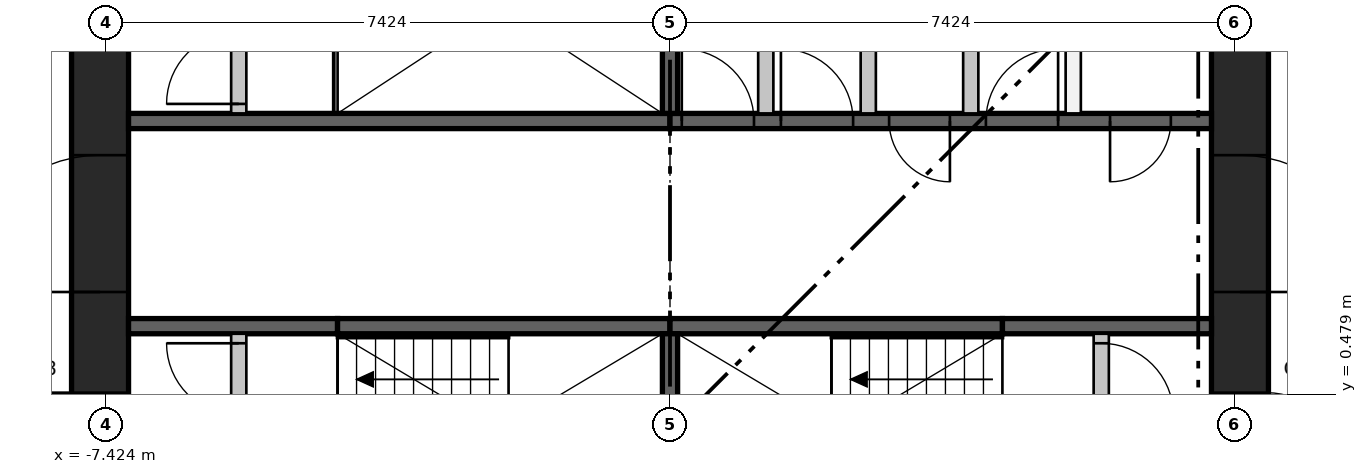
"""IFC4 building model, lengths in metres.
Left out: names, types, materials, properties, quantities, classifications, styles, units other than length and angle.
Written with IfcOpenShell. Run it as: python <this file> out.ifc"""

import sys

from ifc_helpers import new_model, si_unit, direction, frame, frame_2d, origin, place, context, subcontext, project, spatial, rectangle, extrude, element, fill, save


model = new_model("IFC4")
c1 = context("Model", 3, precision=1e-05, world=origin(), true_north=direction((0.0, 1.0)))
c2 = subcontext(c1, "Body", "Model", "MODEL_VIEW")
j1 = project(units=[si_unit("LENGTHUNIT", "METRE"), si_unit("PLANEANGLEUNIT", "RADIAN")], contexts=[c1])
p1 = place(None, origin())
s1 = spatial("IfcSite", under=j1, at=p1, CompositionType="ELEMENT")
p2 = place(p1, origin())
s2 = spatial("IfcBuilding", under=s1, at=p2, CompositionType="ELEMENT")
p3 = place(p2, frame((0.0, 0.0, 112.9)))
s3 = spatial("IfcBuildingStorey", under=s2, at=p3, CompositionType="ELEMENT", Elevation=112.9)
p4 = place(p3, frame((-7.499, -7.124, 0.0), z_axis=(0.0, 0.0, 1.0), x_axis=(0.0, 1.0, 0.0)))
e1 = element("IfcWall", 1, at=p4, inside=s3, PredefinedType="SHEAR", context=c2, shape_type="SweptSolid", body=[
    extrude(rectangle(XDim=14.248, YDim=0.75, at=frame_2d((7.124, 0.0))), origin(), (0.0, 0.0, 1.0), 3.65),
])
p5 = place(p4, frame((6.624, 0.0, 0.0)))
e2 = element("IfcOpeningElement", 2, at=p5, cuts=e1, PredefinedType="OPENING", context=c2, shape_type="SweptSolid", body=[
    extrude(rectangle(XDim=1.0, YDim=2.1, at=frame_2d((0.5, 1.05))), frame((0.0, 0.385, 0.0), z_axis=(0.0, -1.0, 0.0), x_axis=(1.0, 0.0, 0.0)), (0.0, 0.0, 1.0), 0.77),
])
p6 = place(p4, frame((3.5, 0.0, 0.0)))
e3 = element("IfcOpeningElement", 3, at=p6, cuts=e1, PredefinedType="OPENING", context=c2, shape_type="SweptSolid", body=[
    extrude(rectangle(XDim=1.8, YDim=2.1, at=frame_2d((0.9, 1.05))), frame((0.0, 0.385, 0.0), z_axis=(0.0, -1.0, 0.0), x_axis=(1.0, 0.0, 0.0)), (0.0, 0.0, 1.0), 0.77),
])
p7 = place(p4, frame((8.948, 0.0, 0.0)))
e4 = element("IfcOpeningElement", 4, at=p7, cuts=e1, PredefinedType="OPENING", context=c2, shape_type="SweptSolid", body=[
    extrude(rectangle(XDim=1.8, YDim=2.1, at=frame_2d((0.9, 1.05))), frame((0.0, 0.385, 0.0), z_axis=(0.0, -1.0, 0.0), x_axis=(1.0, 0.0, 0.0)), (0.0, 0.0, 1.0), 0.77),
])
p8 = place(p4, frame((12.124, 0.0, 0.0)))
e5 = element("IfcOpeningElement", 5, at=p8, cuts=e1, PredefinedType="OPENING", context=c2, shape_type="SweptSolid", body=[
    extrude(rectangle(XDim=1.0, YDim=2.1, at=frame_2d((0.5, 1.05))), frame((0.0, 0.385, 0.0), z_axis=(0.0, -1.0, 0.0), x_axis=(1.0, 0.0, 0.0)), (0.0, 0.0, 1.0), 0.77),
])
p9 = place(p3, frame((7.499, -7.124, 0.0), z_axis=(0.0, 0.0, 1.0), x_axis=(0.0, 1.0, 0.0)))
e6 = element("IfcWall", 6, at=p9, inside=s3, PredefinedType="SHEAR", context=c2, shape_type="SweptSolid", body=[
    extrude(rectangle(XDim=14.248, YDim=0.75, at=frame_2d((7.124, 0.0))), origin(), (0.0, 0.0, 1.0), 3.65),
])
p10 = place(p9, frame((6.624, 0.0, 0.0)))
e7 = element("IfcOpeningElement", 7, at=p10, cuts=e6, PredefinedType="OPENING", context=c2, shape_type="SweptSolid", body=[
    extrude(rectangle(XDim=1.0, YDim=2.1, at=frame_2d((0.5, 1.05))), frame((0.0, 0.385, 0.0), z_axis=(0.0, -1.0, 0.0), x_axis=(1.0, 0.0, 0.0)), (0.0, 0.0, 1.0), 0.77),
])
p11 = place(p9, frame((3.5, 0.0, 0.0)))
e8 = element("IfcOpeningElement", 8, at=p11, cuts=e6, PredefinedType="OPENING", context=c2, shape_type="SweptSolid", body=[
    extrude(rectangle(XDim=1.8, YDim=2.1, at=frame_2d((0.9, 1.05))), frame((0.0, 0.385, 0.0), z_axis=(0.0, -1.0, 0.0), x_axis=(1.0, 0.0, 0.0)), (0.0, 0.0, 1.0), 0.77),
])
p12 = place(p9, frame((8.948, 0.0, 0.0)))
e9 = element("IfcOpeningElement", 9, at=p12, cuts=e6, PredefinedType="OPENING", context=c2, shape_type="SweptSolid", body=[
    extrude(rectangle(XDim=1.8, YDim=2.1, at=frame_2d((0.9, 1.05))), frame((0.0, 0.385, 0.0), z_axis=(0.0, -1.0, 0.0), x_axis=(1.0, 0.0, 0.0)), (0.0, 0.0, 1.0), 0.77),
])
p13 = place(p3, frame((-7.124, 4.074, 0.0), z_axis=(0.0, 0.0, 1.0), x_axis=(1.0, 0.0, 0.0)))
e10 = element("IfcWall", 10, at=p13, inside=s3, PredefinedType="SHEAR", context=c2, shape_type="SweptSolid", body=[
    extrude(rectangle(XDim=7.124, YDim=0.2, at=frame_2d((3.562, 0.0))), origin(), (0.0, 0.0, 1.0), 3.3),
])
p14 = place(p3, frame((0.0, 4.074, 0.0), z_axis=(0.0, 0.0, 1.0), x_axis=(1.0, 0.0, 0.0)))
e11 = element("IfcWall", 11, at=p14, inside=s3, PredefinedType="SHEAR", context=c2, shape_type="SweptSolid", body=[
    extrude(rectangle(XDim=7.124, YDim=0.2, at=frame_2d((3.562, 0.0))), origin(), (0.0, 0.0, 1.0), 3.3),
])
p15 = place(p14, frame((0.155, 0.0, 0.0)))
e12 = element("IfcOpeningElement", 12, at=p15, cuts=e11, PredefinedType="OPENING", context=c2, shape_type="SweptSolid", body=[
    extrude(rectangle(XDim=0.95, YDim=2.1, at=frame_2d((0.475, 1.05))), frame((0.0, 0.11, 0.0), z_axis=(0.0, -1.0, 0.0), x_axis=(1.0, 0.0, 0.0)), (0.0, 0.0, 1.0), 0.22),
])
p16 = place(p14, frame((1.459, 0.0, 0.0)))
e13 = element("IfcOpeningElement", 13, at=p16, cuts=e11, PredefinedType="OPENING", context=c2, shape_type="SweptSolid", body=[
    extrude(rectangle(XDim=0.95, YDim=2.1, at=frame_2d((0.475, 1.05))), frame((0.0, 0.11, 0.0), z_axis=(0.0, -1.0, 0.0), x_axis=(1.0, 0.0, 0.0)), (0.0, 0.0, 1.0), 0.22),
])
p17 = place(p14, frame((2.883, 0.0, 0.0)))
e14 = element("IfcOpeningElement", 14, at=p17, cuts=e11, PredefinedType="OPENING", context=c2, shape_type="SweptSolid", body=[
    extrude(rectangle(XDim=0.8, YDim=2.1, at=frame_2d((0.4, 1.05))), frame((0.0, 0.11, 0.0), z_axis=(0.0, -1.0, 0.0), x_axis=(1.0, 0.0, 0.0)), (0.0, 0.0, 1.0), 0.22),
])
p18 = place(p14, frame((4.156, 0.0, 0.0)))
e15 = element("IfcOpeningElement", 15, at=p18, cuts=e11, PredefinedType="OPENING", context=c2, shape_type="SweptSolid", body=[
    extrude(rectangle(XDim=0.95, YDim=2.1, at=frame_2d((0.475, 1.05))), frame((0.0, 0.11, 0.0), z_axis=(0.0, -1.0, 0.0), x_axis=(1.0, 0.0, 0.0)), (0.0, 0.0, 1.0), 0.22),
])
p19 = place(p14, frame((5.79, 0.0, 0.0)))
e16 = element("IfcOpeningElement", 16, at=p19, cuts=e11, PredefinedType="OPENING", context=c2, shape_type="SweptSolid", body=[
    extrude(rectangle(XDim=0.8, YDim=2.1, at=frame_2d((0.4, 1.05))), frame((0.0, 0.11, 0.0), z_axis=(0.0, -1.0, 0.0), x_axis=(1.0, 0.0, 0.0)), (0.0, 0.0, 1.0), 0.22),
])
p20 = place(p3, frame((-7.124, 1.375, 0.0), z_axis=(0.0, 0.0, 1.0), x_axis=(1.0, 0.0, 0.0)))
e17 = element("IfcWall", 17, at=p20, inside=s3, PredefinedType="SHEAR", context=c2, shape_type="SweptSolid", body=[
    extrude(rectangle(XDim=2.75, YDim=0.2, at=frame_2d((1.375, 0.0))), origin(), (0.0, 0.0, 1.0), 3.3),
])
for number, where, z_axis, x_axis in (
    (18, (-4.374, 1.375, 0.0), (0.0, 0.0, 1.0), (1.0, 0.0, 0.0)),
    (19, (0.0, 1.375, 0.0), (0.0, 0.0, 1.0), (1.0, 0.0, 0.0)),
):
    element("IfcWall", number, at=place(p3, frame(where, z_axis=z_axis, x_axis=x_axis)), inside=s3, PredefinedType="SHEAR", context=c2, shape_type="SweptSolid", body=[
        extrude(rectangle(XDim=4.374, YDim=0.2, at=frame_2d((2.187, 0.0))), origin(), (0.0, 0.0, 1.0), 3.3),
    ])
p21 = place(p3, frame((4.374, 1.375, 0.0), z_axis=(0.0, 0.0, 1.0), x_axis=(1.0, 0.0, 0.0)))
e20 = element("IfcWall", 20, at=p21, inside=s3, PredefinedType="SHEAR", context=c2, shape_type="SweptSolid", body=[
    extrude(rectangle(XDim=2.75, YDim=0.2, at=frame_2d((1.375, 0.0))), origin(), (0.0, 0.0, 1.0), 3.3),
])
p22 = place(p3, frame((0.0, -1.275, 0.0), z_axis=(0.0, 0.0, 1.0), x_axis=(0.0, 1.0, 0.0)))
e21 = element("IfcWall", 21, at=p22, inside=s3, PredefinedType="SHEAR", context=c2, shape_type="SweptSolid", body=[
    extrude(rectangle(XDim=2.55, YDim=0.2, at=frame_2d((1.275, 0.0))), origin(), (0.0, 0.0, 1.0), 3.3),
])
p23 = place(p3, frame((0.0, 4.174, 0.0), z_axis=(0.0, 0.0, 1.0), x_axis=(0.0, 1.0, 0.0)))
e22 = element("IfcWall", 22, at=p23, inside=s3, PredefinedType="SHEAR", context=c2, shape_type="SweptSolid", body=[
    extrude(rectangle(XDim=1.4, YDim=0.2, at=frame_2d((0.7, 0.0))), origin(), (0.0, 0.0, 1.0), 3.3),
])
for number, where, z_axis, x_axis in (
    (23, (1.26, 4.174, 0.0), (0.0, 0.0, 1.0), (0.0, 1.0, 0.0)),
    (24, (2.609, 4.174, 0.0), (0.0, 0.0, 1.0), (0.0, 1.0, 0.0)),
    (25, (3.957, 4.174, 0.0), (0.0, 0.0, 1.0), (0.0, 1.0, 0.0)),
    (26, (5.305, 4.174, 0.0), (0.0, 0.0, 1.0), (0.0, 1.0, 0.0)),
):
    element("IfcWall", number, at=place(p3, frame(where, z_axis=z_axis, x_axis=x_axis)), inside=s3, PredefinedType="PARTITIONING", context=c2, shape_type="SweptSolid", body=[
        extrude(rectangle(XDim=2.95, YDim=0.2, at=frame_2d((1.475, 0.0))), origin(), (0.0, 0.0, 1.0), 3.3),
    ])
p24 = place(p3, frame((-5.674, -1.275, 0.0), z_axis=(0.0, 0.0, 1.0), x_axis=(0.0, 1.0, 0.0)))
e27 = element("IfcWall", 27, at=p24, inside=s3, PredefinedType="PARTITIONING", context=c2, shape_type="SweptSolid", body=[
    extrude(rectangle(XDim=2.55, YDim=0.2, at=frame_2d((1.275, 0.0))), origin(), (0.0, 0.0, 1.0), 3.3),
])
p25 = place(p24, frame((0.125, 0.0, 0.0)))
e28 = element("IfcOpeningElement", 28, at=p25, cuts=e27, PredefinedType="OPENING", context=c2, shape_type="SweptSolid", body=[
    extrude(rectangle(XDim=0.95, YDim=2.1, at=frame_2d((0.475, 1.05))), frame((0.0, 0.11, 0.0), z_axis=(0.0, -1.0, 0.0), x_axis=(1.0, 0.0, 0.0)), (0.0, 0.0, 1.0), 0.22),
])
p26 = place(p24, frame((1.475, 0.0, 0.0)))
e29 = element("IfcOpeningElement", 29, at=p26, cuts=e27, PredefinedType="OPENING", context=c2, shape_type="SweptSolid", body=[
    extrude(rectangle(XDim=0.95, YDim=2.1, at=frame_2d((0.475, 1.05))), frame((0.0, 0.11, 0.0), z_axis=(0.0, -1.0, 0.0), x_axis=(1.0, 0.0, 0.0)), (0.0, 0.0, 1.0), 0.22),
])
p27 = place(p3, frame((5.674, -1.275, 0.0), z_axis=(0.0, 0.0, 1.0), x_axis=(0.0, 1.0, 0.0)))
e30 = element("IfcWall", 30, at=p27, inside=s3, PredefinedType="PARTITIONING", context=c2, shape_type="SweptSolid", body=[
    extrude(rectangle(XDim=2.55, YDim=0.2, at=frame_2d((1.275, 0.0))), origin(), (0.0, 0.0, 1.0), 3.3),
])
p28 = place(p27, frame((0.125, 0.0, 0.0)))
e31 = element("IfcOpeningElement", 31, at=p28, cuts=e30, PredefinedType="OPENING", context=c2, shape_type="SweptSolid", body=[
    extrude(rectangle(XDim=0.95, YDim=2.1, at=frame_2d((0.475, 1.05))), frame((0.0, 0.11, 0.0), z_axis=(0.0, -1.0, 0.0), x_axis=(1.0, 0.0, 0.0)), (0.0, 0.0, 1.0), 0.22),
])
p29 = place(p27, frame((1.475, 0.0, 0.0)))
e32 = element("IfcOpeningElement", 32, at=p29, cuts=e30, PredefinedType="OPENING", context=c2, shape_type="SweptSolid", body=[
    extrude(rectangle(XDim=0.95, YDim=2.1, at=frame_2d((0.475, 1.05))), frame((0.0, 0.11, 0.0), z_axis=(0.0, -1.0, 0.0), x_axis=(1.0, 0.0, 0.0)), (0.0, 0.0, 1.0), 0.22),
])
p30 = place(p3, frame((-5.674, 4.174, 0.0), z_axis=(0.0, 0.0, 1.0), x_axis=(0.0, 1.0, 0.0)))
e33 = element("IfcWall", 33, at=p30, inside=s3, PredefinedType="PARTITIONING", context=c2, shape_type="SweptSolid", body=[
    extrude(rectangle(XDim=2.95, YDim=0.2, at=frame_2d((1.475, 0.0))), origin(), (0.0, 0.0, 1.0), 3.3),
])
p31 = place(p30, frame((0.125, 0.0, 0.0)))
e34 = element("IfcOpeningElement", 34, at=p31, cuts=e33, PredefinedType="OPENING", context=c2, shape_type="SweptSolid", body=[
    extrude(rectangle(XDim=0.95, YDim=2.1, at=frame_2d((0.475, 1.05))), frame((0.0, 0.11, 0.0), z_axis=(0.0, -1.0, 0.0), x_axis=(1.0, 0.0, 0.0)), (0.0, 0.0, 1.0), 0.22),
])
p32 = place(p30, frame((1.725, 0.0, 0.0)))
e35 = element("IfcOpeningElement", 35, at=p32, cuts=e33, PredefinedType="OPENING", context=c2, shape_type="SweptSolid", body=[
    extrude(rectangle(XDim=0.95, YDim=2.1, at=frame_2d((0.475, 1.05))), frame((0.0, 0.11, 0.0), z_axis=(0.0, -1.0, 0.0), x_axis=(1.0, 0.0, 0.0)), (0.0, 0.0, 1.0), 0.22),
])
p33 = place(p26, origin())
e36 = element("IfcDoor", 36, at=p33, inside=s3, OperationType="SINGLE_SWING_RIGHT", PredefinedType="DOOR", context=c2, shape_type="SweptSolid", body=[
    extrude(rectangle(XDim=0.95, YDim=2.1, at=frame_2d((0.475, 1.05))), frame((0.0, 0.025, 0.0), z_axis=(0.0, -1.0, 0.0), x_axis=(1.0, 0.0, 0.0)), (0.0, 0.0, 1.0), 0.05),
])
fill(e29, e36)
p34 = place(p29, frame((0.95, 0.0, 0.0), z_axis=(0.0, 0.0, 1.0), x_axis=(-1.0, 0.0, 0.0)))
e37 = element("IfcDoor", 37, at=p34, inside=s3, OperationType="SINGLE_SWING_LEFT", PredefinedType="DOOR", context=c2, shape_type="SweptSolid", body=[
    extrude(rectangle(XDim=0.95, YDim=2.1, at=frame_2d((0.475, 1.05))), frame((0.0, 0.025, 0.0), z_axis=(0.0, -1.0, 0.0), x_axis=(1.0, 0.0, 0.0)), (0.0, 0.0, 1.0), 0.05),
])
fill(e32, e37)
p35 = place(p31, origin())
e38 = element("IfcDoor", 38, at=p35, inside=s3, OperationType="SINGLE_SWING_LEFT", PredefinedType="DOOR", context=c2, shape_type="SweptSolid", body=[
    extrude(rectangle(XDim=0.95, YDim=2.1, at=frame_2d((0.475, 1.05))), frame((0.0, 0.025, 0.0), z_axis=(0.0, -1.0, 0.0), x_axis=(1.0, 0.0, 0.0)), (0.0, 0.0, 1.0), 0.05),
])
fill(e34, e38)
p36 = place(p15, origin())
e39 = element("IfcDoor", 39, at=p36, inside=s3, OperationType="SINGLE_SWING_LEFT", PredefinedType="DOOR", context=c2, shape_type="SweptSolid", body=[
    extrude(rectangle(XDim=0.95, YDim=2.1, at=frame_2d((0.475, 1.05))), frame((0.0, 0.025, 0.0), z_axis=(0.0, -1.0, 0.0), x_axis=(1.0, 0.0, 0.0)), (0.0, 0.0, 1.0), 0.05),
])
fill(e12, e39)
p37 = place(p16, origin())
e40 = element("IfcDoor", 40, at=p37, inside=s3, OperationType="SINGLE_SWING_LEFT", PredefinedType="DOOR", context=c2, shape_type="SweptSolid", body=[
    extrude(rectangle(XDim=0.95, YDim=2.1, at=frame_2d((0.475, 1.05))), frame((0.0, 0.025, 0.0), z_axis=(0.0, -1.0, 0.0), x_axis=(1.0, 0.0, 0.0)), (0.0, 0.0, 1.0), 0.05),
])
fill(e13, e40)
p38 = place(p17, frame((0.8, 0.0, 0.0), z_axis=(0.0, 0.0, 1.0), x_axis=(-1.0, 0.0, 0.0)))
e41 = element("IfcDoor", 41, at=p38, inside=s3, OperationType="SINGLE_SWING_RIGHT", PredefinedType="DOOR", context=c2, shape_type="SweptSolid", body=[
    extrude(rectangle(XDim=0.8, YDim=2.1, at=frame_2d((0.4, 1.05))), frame((0.0, 0.025, 0.0), z_axis=(0.0, -1.0, 0.0), x_axis=(1.0, 0.0, 0.0)), (0.0, 0.0, 1.0), 0.05),
])
fill(e14, e41)
p39 = place(p18, origin())
e42 = element("IfcDoor", 42, at=p39, inside=s3, OperationType="SINGLE_SWING_RIGHT", PredefinedType="DOOR", context=c2, shape_type="SweptSolid", body=[
    extrude(rectangle(XDim=0.95, YDim=2.1, at=frame_2d((0.475, 1.05))), frame((0.0, 0.025, 0.0), z_axis=(0.0, -1.0, 0.0), x_axis=(1.0, 0.0, 0.0)), (0.0, 0.0, 1.0), 0.05),
])
fill(e15, e42)
p40 = place(p19, frame((0.8, 0.0, 0.0), z_axis=(0.0, 0.0, 1.0), x_axis=(-1.0, 0.0, 0.0)))
e43 = element("IfcDoor", 43, at=p40, inside=s3, OperationType="SINGLE_SWING_LEFT", PredefinedType="DOOR", context=c2, shape_type="SweptSolid", body=[
    extrude(rectangle(XDim=0.8, YDim=2.1, at=frame_2d((0.4, 1.05))), frame((0.0, 0.025, 0.0), z_axis=(0.0, -1.0, 0.0), x_axis=(1.0, 0.0, 0.0)), (0.0, 0.0, 1.0), 0.05),
])
fill(e16, e43)
p41 = place(p5, origin())
e44 = element("IfcDoor", 44, at=p41, inside=s3, OperationType="SINGLE_SWING_RIGHT", PredefinedType="DOOR", context=c2, shape_type="SweptSolid", body=[
    extrude(rectangle(XDim=1.0, YDim=2.1, at=frame_2d((0.5, 1.05))), frame((0.0, 0.375, 0.0), z_axis=(0.0, -1.0, 0.0), x_axis=(1.0, 0.0, 0.0)), (0.0, 0.0, 1.0), 0.05),
])
fill(e2, e44)
p42 = place(p7, origin())
e45 = element("IfcDoor", 45, at=p42, inside=s3, OperationType="DOUBLE_DOOR_SINGLE_SWING", PredefinedType="DOOR", context=c2, shape_type="SweptSolid", body=[
    extrude(rectangle(XDim=1.8, YDim=2.1, at=frame_2d((0.9, 1.05))), frame((0.0, 0.025, 0.0), z_axis=(0.0, -1.0, 0.0), x_axis=(1.0, 0.0, 0.0)), (0.0, 0.0, 1.0), 0.05),
])
fill(e4, e45)
p43 = place(p10, frame((1.0, 0.0, 0.0), z_axis=(0.0, 0.0, 1.0), x_axis=(-1.0, 0.0, 0.0)))
e46 = element("IfcDoor", 46, at=p43, inside=s3, OperationType="SINGLE_SWING_LEFT", PredefinedType="DOOR", context=c2, shape_type="SweptSolid", body=[
    extrude(rectangle(XDim=1.0, YDim=2.1, at=frame_2d((0.5, 1.05))), frame((0.0, 0.375, 0.0), z_axis=(0.0, -1.0, 0.0), x_axis=(1.0, 0.0, 0.0)), (0.0, 0.0, 1.0), 0.05),
])
fill(e7, e46)
p44 = place(p12, frame((1.8, 0.0, 0.0), z_axis=(0.0, 0.0, 1.0), x_axis=(-1.0, 0.0, 0.0)))
e47 = element("IfcDoor", 47, at=p44, inside=s3, OperationType="DOUBLE_DOOR_SINGLE_SWING", PredefinedType="DOOR", context=c2, shape_type="SweptSolid", body=[
    extrude(rectangle(XDim=1.8, YDim=2.1, at=frame_2d((0.9, 1.05))), frame((0.0, 0.025, 0.0), z_axis=(0.0, -1.0, 0.0), x_axis=(1.0, 0.0, 0.0)), (0.0, 0.0, 1.0), 0.05),
])
fill(e9, e47)
save(model, sys.argv[1])
